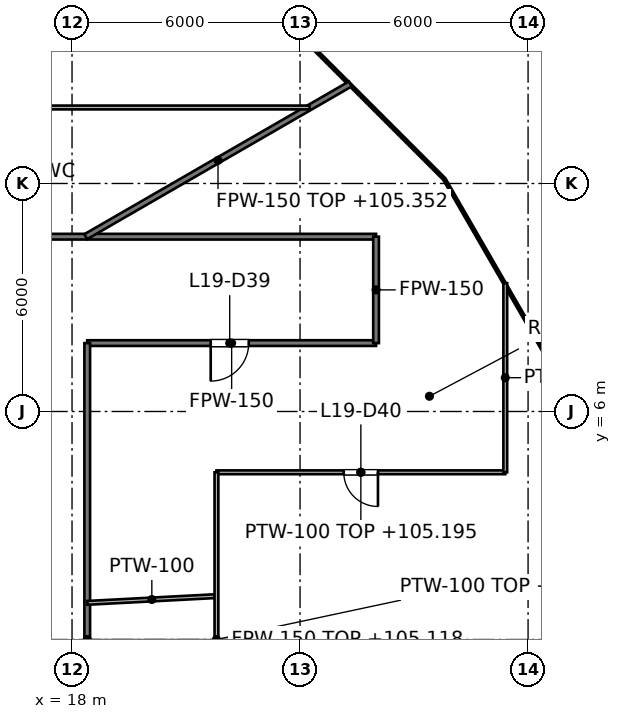
"""IFC4 building model, lengths in metres.
Left out: names, types, materials, properties, quantities, classifications, styles, units other than length and angle.
Written with IfcOpenShell. Run it as: python <this file> out.ifc"""

import sys

from ifc_helpers import new_model, si_unit, direction, frame, frame_2d, origin, place, context, subcontext, project, spatial, rectangle, extrude, element, fill, save


model = new_model("IFC4")
c1 = context("Model", 3, precision=1e-05, world=origin(), true_north=direction((0.0, 1.0)))
c2 = subcontext(c1, "Body", "Model", "MODEL_VIEW")
j1 = project(units=[si_unit("LENGTHUNIT", "METRE"), si_unit("PLANEANGLEUNIT", "RADIAN")], contexts=[c1])
p1 = place(None, origin())
s1 = spatial("IfcSite", under=j1, at=p1, CompositionType="ELEMENT")
p2 = place(p1, origin())
s2 = spatial("IfcBuilding", under=s1, at=p2, CompositionType="ELEMENT")
p3 = place(p2, frame((0.0, 0.0, 102.0)))
s3 = spatial("IfcBuildingStorey", under=s2, at=p3, CompositionType="ELEMENT", Elevation=102.0)
p4 = place(p3, frame((18.4, 7.8, 0.0), z_axis=(0.0, 0.0, 1.0), x_axis=(1.0, 0.0, 0.0)))
e1 = element("IfcWall", 1, at=p4, inside=s3, PredefinedType="PARTITIONING", context=c2, shape_type="SweptSolid", body=[
    extrude(rectangle(XDim=7.6, YDim=0.15, at=frame_2d((3.8, 0.0))), origin(), (0.0, 0.0, 1.0), 3.276),
])
p5 = place(p4, frame((3.249, 0.0, 0.0)))
e2 = element("IfcOpeningElement", 2, at=p5, cuts=e1, PredefinedType="OPENING", context=c2, shape_type="SweptSolid", body=[
    extrude(rectangle(XDim=1.0, YDim=2.1, at=frame_2d((0.5, 1.05))), frame((0.0, 0.075, 0.0), z_axis=(0.0, -1.0, 0.0), x_axis=(1.0, 0.0, 0.0)), (0.0, 0.0, 1.0), 0.15),
])
p6 = place(p3, frame((-26.0, 10.6, 0.0), z_axis=(0.0, 0.0, 1.0), x_axis=(1.0, 0.0, 0.0)))
e3 = element("IfcWall", 3, at=p6, inside=s3, PredefinedType="PARTITIONING", context=c2, shape_type="SweptSolid", body=[
    extrude(rectangle(XDim=52.0, YDim=0.15, at=frame_2d((26.0, 0.0))), origin(), (0.0, 0.0, 1.0), 3.127),
])
p7 = place(p6, frame((40.753, 0.0, 0.0)))
e4 = element("IfcOpeningElement", 4, at=p7, cuts=e3, PredefinedType="OPENING", context=c2, shape_type="SweptSolid", body=[
    extrude(rectangle(XDim=1.0, YDim=2.1, at=frame_2d((0.5, 1.05))), frame((0.0, 0.075, 0.0), z_axis=(0.0, -1.0, 0.0), x_axis=(1.0, 0.0, 0.0)), (0.0, 0.0, 1.0), 0.15),
])
p8 = place(p6, frame((31.36, 0.0, 0.0)))
e5 = element("IfcOpeningElement", 5, at=p8, cuts=e3, PredefinedType="OPENING", context=c2, shape_type="SweptSolid", body=[
    extrude(rectangle(XDim=1.0, YDim=2.1, at=frame_2d((0.5, 1.05))), frame((0.0, 0.075, 0.0), z_axis=(0.0, -1.0, 0.0), x_axis=(1.0, 0.0, 0.0)), (0.0, 0.0, 1.0), 0.15),
])
p9 = place(p6, frame((23.878, 0.0, 0.0)))
e6 = element("IfcOpeningElement", 6, at=p9, cuts=e3, PredefinedType="OPENING", context=c2, shape_type="SweptSolid", body=[
    extrude(rectangle(XDim=1.0, YDim=2.1, at=frame_2d((0.5, 1.05))), frame((0.0, 0.075, 0.0), z_axis=(0.0, -1.0, 0.0), x_axis=(1.0, 0.0, 0.0)), (0.0, 0.0, 1.0), 0.15),
])
p10 = place(p6, frame((20.638, 0.0, 0.0)))
e7 = element("IfcOpeningElement", 7, at=p10, cuts=e3, PredefinedType="OPENING", context=c2, shape_type="SweptSolid", body=[
    extrude(rectangle(XDim=1.0, YDim=2.1, at=frame_2d((0.5, 1.05))), frame((0.0, 0.075, 0.0), z_axis=(0.0, -1.0, 0.0), x_axis=(1.0, 0.0, 0.0)), (0.0, 0.0, 1.0), 0.15),
])
p11 = place(p6, frame((12.808, 0.0, 0.0)))
e8 = element("IfcOpeningElement", 8, at=p11, cuts=e3, PredefinedType="OPENING", context=c2, shape_type="SweptSolid", body=[
    extrude(rectangle(XDim=1.0, YDim=2.1, at=frame_2d((0.5, 1.05))), frame((0.0, 0.075, 0.0), z_axis=(0.0, -1.0, 0.0), x_axis=(1.0, 0.0, 0.0)), (0.0, 0.0, 1.0), 0.15),
])
p12 = place(p3, frame((18.361, 10.6, 0.0), z_axis=(0.0, 0.0, 1.0), x_axis=(0.866017655369, 0.500013420409, 0.0)))
e9 = element("IfcWall", 9, at=p12, inside=s3, PredefinedType="PARTITIONING", context=c2, shape_type="SweptSolid", body=[
    extrude(rectangle(XDim=8.038, YDim=0.15, at=frame_2d((4.019, 0.0))), origin(), (0.0, 0.0, 1.0), 3.352),
])
p13 = place(p3, frame((26.0, 7.8, 0.0), z_axis=(0.0, 0.0, 1.0), x_axis=(0.0, 1.0, 0.0)))
e10 = element("IfcWall", 10, at=p13, inside=s3, PredefinedType="PARTITIONING", context=c2, shape_type="SweptSolid", body=[
    extrude(rectangle(XDim=2.8, YDim=0.15, at=frame_2d((1.4, 0.0))), origin(), (0.0, 0.0, 1.0), 3.276),
])
p14 = place(p3, frame((18.4, -7.8, 0.0), z_axis=(0.0, 0.0, 1.0), x_axis=(0.0, 1.0, 0.0)))
e11 = element("IfcWall", 11, at=p14, inside=s3, PredefinedType="PARTITIONING", context=c2, shape_type="SweptSolid", body=[
    extrude(rectangle(XDim=15.6, YDim=0.15, at=frame_2d((7.8, 0.0))), origin(), (0.0, 0.0, 1.0), 3.118),
])
p15 = place(p14, frame((5.317, 0.0, 0.0)))
e12 = element("IfcOpeningElement", 12, at=p15, cuts=e11, PredefinedType="OPENING", context=c2, shape_type="SweptSolid", body=[
    extrude(rectangle(XDim=1.0, YDim=2.1, at=frame_2d((0.5, 1.05))), frame((0.0, 0.075, 0.0), z_axis=(0.0, -1.0, 0.0), x_axis=(1.0, 0.0, 0.0)), (0.0, 0.0, 1.0), 0.15),
])
p16 = place(p3, frame((21.8, 4.4, 0.0), z_axis=(0.0, 0.0, 1.0), x_axis=(1.0, 0.0, 0.0)))
e13 = element("IfcWall", 13, at=p16, inside=s3, PredefinedType="PARTITIONING", context=c2, shape_type="SweptSolid", body=[
    extrude(rectangle(XDim=7.6, YDim=0.1, at=frame_2d((3.8, 0.0))), origin(), (0.0, 0.0, 1.0), 3.195),
])
p17 = place(p16, frame((3.35, 0.0, 0.0)))
e14 = element("IfcOpeningElement", 14, at=p17, cuts=e13, PredefinedType="OPENING", context=c2, shape_type="SweptSolid", body=[
    extrude(rectangle(XDim=0.9, YDim=2.1, at=frame_2d((0.45, 1.05))), frame((0.0, 0.05, 0.0), z_axis=(0.0, -1.0, 0.0), x_axis=(1.0, 0.0, 0.0)), (0.0, 0.0, 1.0), 0.1),
])
p18 = place(p3, frame((-24.25, 14.0, 0.0), z_axis=(0.0, 0.0, 1.0), x_axis=(1.0, 0.0, 0.0)))
e15 = element("IfcWall", 15, at=p18, inside=s3, PredefinedType="PARTITIONING", context=c2, shape_type="SweptSolid", body=[
    extrude(rectangle(XDim=48.5, YDim=0.1, at=frame_2d((24.25, 0.0))), origin(), (0.0, 0.0, 1.0), 3.127),
])
p19 = place(p18, frame((31.105, 0.0, 0.0)))
e16 = element("IfcOpeningElement", 16, at=p19, cuts=e15, PredefinedType="OPENING", context=c2, shape_type="SweptSolid", body=[
    extrude(rectangle(XDim=1.8, YDim=2.1, at=frame_2d((0.9, 1.05))), frame((0.0, 0.05, 0.0), z_axis=(0.0, -1.0, 0.0), x_axis=(1.0, 0.0, 0.0)), (0.0, 0.0, 1.0), 0.1),
])
p20 = place(p18, frame((7.129, 0.0, 0.0)))
e17 = element("IfcOpeningElement", 17, at=p20, cuts=e15, PredefinedType="OPENING", context=c2, shape_type="SweptSolid", body=[
    extrude(rectangle(XDim=0.9, YDim=2.1, at=frame_2d((0.45, 1.05))), frame((0.0, 0.05, 0.0), z_axis=(0.0, -1.0, 0.0), x_axis=(1.0, 0.0, 0.0)), (0.0, 0.0, 1.0), 0.1),
])
p21 = place(p3, frame((18.4, 0.964, 0.0), z_axis=(0.0, 0.0, 1.0), x_axis=(0.998632842418, 0.052272804058, 0.0)))
e18 = element("IfcWall", 18, at=p21, inside=s3, PredefinedType="PARTITIONING", context=c2, shape_type="SweptSolid", body=[
    extrude(rectangle(XDim=3.405, YDim=0.1, at=frame_2d((1.702, 0.0))), origin(), (0.0, 0.0, 1.0), 4.05),
])
p22 = place(p3, frame((29.4, 4.4, 0.0), z_axis=(0.0, 0.0, 1.0), x_axis=(0.0, 1.0, 0.0)))
e19 = element("IfcWall", 19, at=p22, inside=s3, PredefinedType="PARTITIONING", context=c2, shape_type="SweptSolid", body=[
    extrude(rectangle(XDim=4.978, YDim=0.1, at=frame_2d((2.489, 0.0))), origin(), (0.0, 0.0, 1.0), 3.127),
])
p23 = place(p3, frame((21.8, -4.4, 0.0), z_axis=(0.0, 0.0, 1.0), x_axis=(0.0, 1.0, 0.0)))
e20 = element("IfcWall", 20, at=p23, inside=s3, PredefinedType="PARTITIONING", context=c2, shape_type="SweptSolid", body=[
    extrude(rectangle(XDim=8.8, YDim=0.1, at=frame_2d((4.4, 0.0))), origin(), (0.0, 0.0, 1.0), 3.118),
])
p24 = place(p5, origin())
e21 = element("IfcDoor", 21, at=p24, inside=s3, OperationType="SINGLE_SWING_LEFT", PredefinedType="DOOR", context=c2, shape_type="SweptSolid", body=[
    extrude(rectangle(XDim=1.0, YDim=2.1, at=frame_2d((0.5, 1.05))), frame((0.0, 0.025, 0.0), z_axis=(0.0, -1.0, 0.0), x_axis=(1.0, 0.0, 0.0)), (0.0, 0.0, 1.0), 0.05),
])
fill(e2, e21)
p25 = place(p17, origin())
e22 = element("IfcDoor", 22, at=p25, inside=s3, OperationType="SINGLE_SWING_RIGHT", PredefinedType="DOOR", context=c2, shape_type="SweptSolid", body=[
    extrude(rectangle(XDim=0.9, YDim=2.1, at=frame_2d((0.45, 1.05))), frame((0.0, 0.025, 0.0), z_axis=(0.0, -1.0, 0.0), x_axis=(1.0, 0.0, 0.0)), (0.0, 0.0, 1.0), 0.05),
])
fill(e14, e22)
save(model, sys.argv[1])
